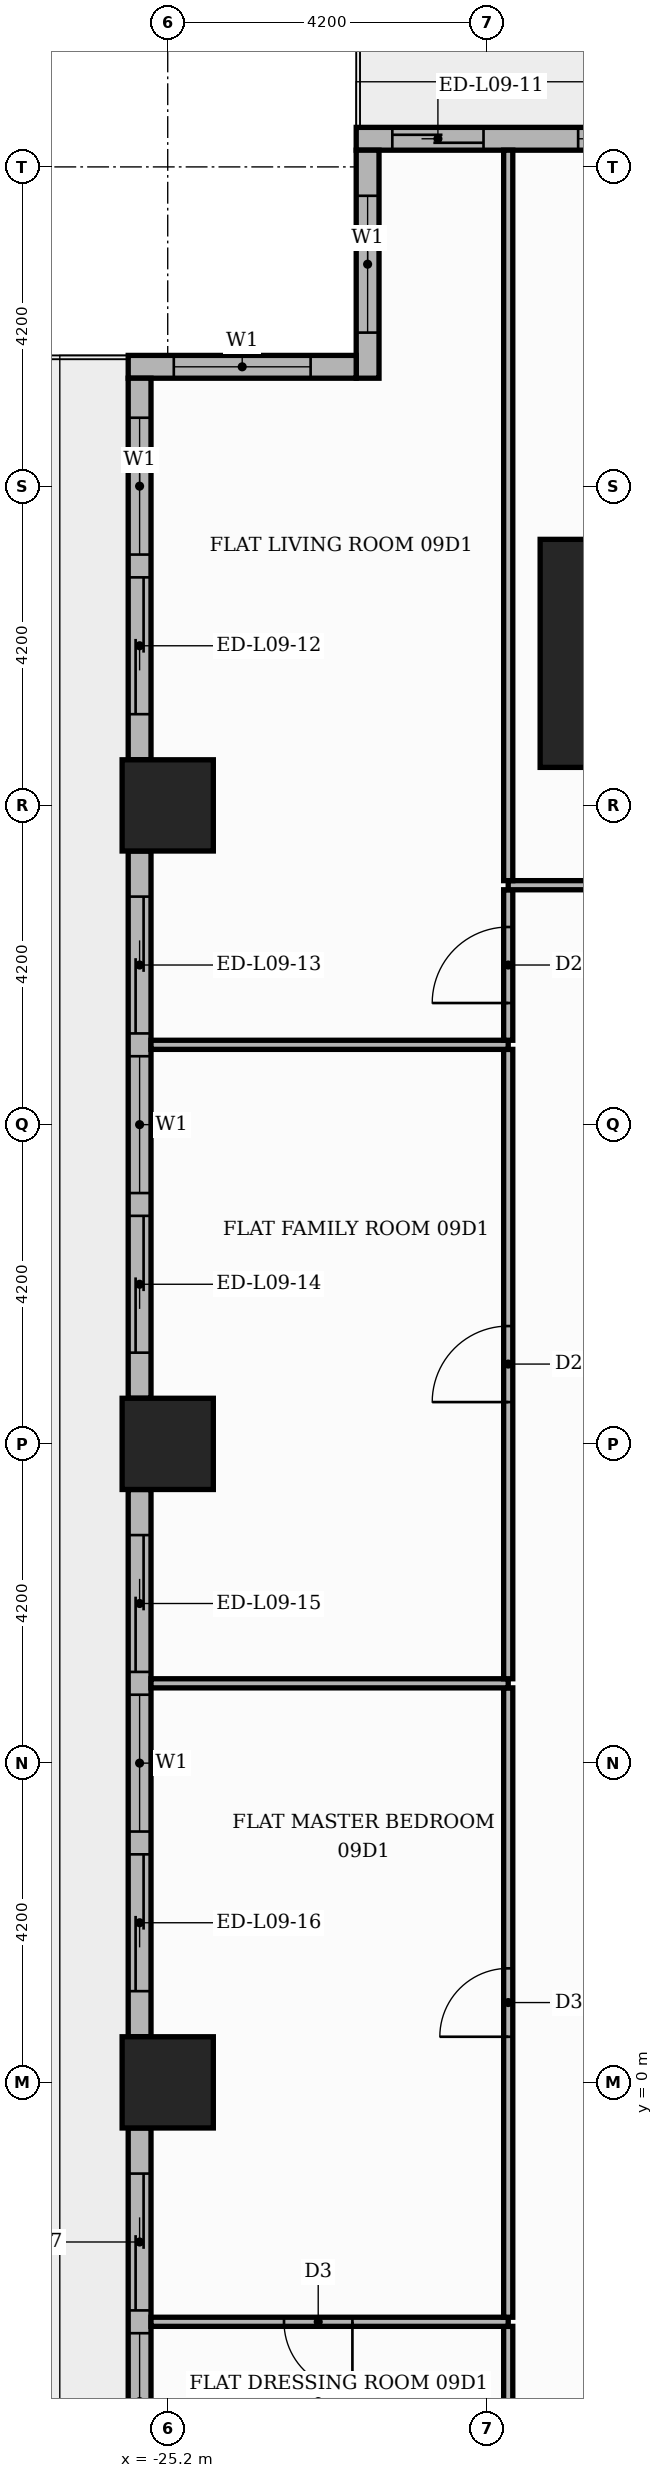
"""IFC4 building model, lengths in metres.
Left out: names, types, materials, properties, quantities, classifications, styles, units other than length and angle.
Written with IfcOpenShell. Run it as: python <this file> out.ifc"""

import sys

from ifc_helpers import new_model, si_unit, direction, frame, frame_2d, origin, origin_2d, place, context, subcontext, project, spatial, rectangle, extrude, element, fill, save


model = new_model("IFC4")
c1 = context("Model", 3, precision=1e-05, world=origin(), true_north=direction((0.0, 1.0)))
c2 = subcontext(c1, "Body", "Model", "MODEL_VIEW")
j1 = project(units=[si_unit("LENGTHUNIT", "METRE"), si_unit("PLANEANGLEUNIT", "RADIAN")], contexts=[c1])
p1 = place(None, origin())
s1 = spatial("IfcSite", under=j1, at=p1, CompositionType="ELEMENT")
p2 = place(p1, origin())
s2 = spatial("IfcBuilding", under=s1, at=p2, CompositionType="ELEMENT")
p3 = place(p2, frame((0.0, 0.0, 42.6)))
s3 = spatial("IfcBuildingStorey", under=s2, at=p3, CompositionType="ELEMENT", Elevation=42.6)
p4 = place(p3, frame((-18.8, 18.8, 0.0), z_axis=(0.0, 0.0, 1.0), x_axis=(1.0, 0.0, 0.0)))
e1 = element("IfcColumn", 1, at=p4, inside=s3, PredefinedType="COLUMN", context=c2, shape_type="SweptSolid", body=[
    extrude(rectangle(XDim=3.0, YDim=3.0, at=origin_2d()), origin(), (0.0, 0.0, 1.0), 3.9),
])
for number, where, z_axis, x_axis in (
    (2, (-25.2, 0.0, 0.0), (0.0, 0.0, 1.0), (1.0, 0.0, 0.0)),
    (3, (-25.2, 8.4, 0.0), (0.0, 0.0, 1.0), (1.0, 0.0, 0.0)),
    (4, (-25.2, 16.8, 0.0), (0.0, 0.0, 1.0), (1.0, 0.0, 0.0)),
):
    element("IfcColumn", number, at=place(p3, frame(where, z_axis=z_axis, x_axis=x_axis)), inside=s3, PredefinedType="COLUMN", context=c2, shape_type="SweptSolid", body=[
        extrude(rectangle(XDim=1.2, YDim=1.2, at=origin_2d()), origin(), (0.0, 0.0, 1.0), 3.9),
    ])
p5 = place(p3, frame((-17.4, 25.57, 0.0), z_axis=(0.0, 0.0, 1.0), x_axis=(-1.0, 0.0, 0.0)))
e5 = element("IfcWall", 5, at=p5, inside=s3, PredefinedType="STANDARD", context=c2, shape_type="SweptSolid", body=[
    extrude(rectangle(XDim=5.32, YDim=0.3, at=frame_2d((2.66, 0.0))), origin(), (0.0, 0.0, 1.0), 3.48),
])
p6 = place(p5, frame((0.6, 0.0, 0.9)))
e6 = element("IfcOpeningElement", 6, at=p6, cuts=e5, PredefinedType="OPENING", context=c2, shape_type="SweptSolid", body=[
    extrude(rectangle(XDim=1.8, YDim=2.1, at=frame_2d((0.9, 1.05))), frame((0.0, 0.16, 0.0), z_axis=(0.0, -1.0, 0.0), x_axis=(1.0, 0.0, 0.0)), (0.0, 0.0, 1.0), 0.32),
])
p7 = place(p5, frame((3.645, 0.0, 0.0)))
e7 = element("IfcOpeningElement", 7, at=p7, cuts=e5, PredefinedType="OPENING", context=c2, shape_type="SweptSolid", body=[
    extrude(rectangle(XDim=1.2, YDim=2.4, at=frame_2d((0.6, 1.2))), frame((0.0, 0.16, 0.0), z_axis=(0.0, -1.0, 0.0), x_axis=(1.0, 0.0, 0.0)), (0.0, 0.0, 1.0), 0.32),
])
p8 = place(p3, frame((-22.57, 25.42, 0.0), z_axis=(0.0, 0.0, 1.0), x_axis=(0.0, -1.0, 0.0)))
e8 = element("IfcWall", 8, at=p8, inside=s3, PredefinedType="STANDARD", context=c2, shape_type="SweptSolid", body=[
    extrude(rectangle(XDim=3.0, YDim=0.3, at=frame_2d((1.5, 0.0))), origin(), (0.0, 0.0, 1.0), 3.48),
])
p9 = place(p8, frame((0.6, 0.0, 0.9)))
e9 = element("IfcOpeningElement", 9, at=p9, cuts=e8, PredefinedType="OPENING", context=c2, shape_type="SweptSolid", body=[
    extrude(rectangle(XDim=1.8, YDim=2.1, at=frame_2d((0.9, 1.05))), frame((0.0, 0.16, 0.0), z_axis=(0.0, -1.0, 0.0), x_axis=(1.0, 0.0, 0.0)), (0.0, 0.0, 1.0), 0.32),
])
p10 = place(p3, frame((-22.72, 22.57, 0.0), z_axis=(0.0, 0.0, 1.0), x_axis=(-1.0, 0.0, 0.0)))
e10 = element("IfcWall", 10, at=p10, inside=s3, PredefinedType="STANDARD", context=c2, shape_type="SweptSolid", body=[
    extrude(rectangle(XDim=3.0, YDim=0.3, at=frame_2d((1.5, 0.0))), origin(), (0.0, 0.0, 1.0), 3.48),
])
p11 = place(p10, frame((0.6, 0.0, 0.9)))
e11 = element("IfcOpeningElement", 11, at=p11, cuts=e10, PredefinedType="OPENING", context=c2, shape_type="SweptSolid", body=[
    extrude(rectangle(XDim=1.8, YDim=2.1, at=frame_2d((0.9, 1.05))), frame((0.0, 0.16, 0.0), z_axis=(0.0, -1.0, 0.0), x_axis=(1.0, 0.0, 0.0)), (0.0, 0.0, 1.0), 0.32),
])
p12 = place(p3, frame((-25.57, 22.42, 0.0), z_axis=(0.0, 0.0, 1.0), x_axis=(0.0, -1.0, 0.0)))
e12 = element("IfcWall", 12, at=p12, inside=s3, PredefinedType="STANDARD", context=c2, shape_type="SweptSolid", body=[
    extrude(rectangle(XDim=5.02, YDim=0.3, at=frame_2d((2.51, 0.0))), origin(), (0.0, 0.0, 1.0), 3.48),
])
p13 = place(p12, frame((0.52, 0.0, 0.9)))
e13 = element("IfcOpeningElement", 13, at=p13, cuts=e12, PredefinedType="OPENING", context=c2, shape_type="SweptSolid", body=[
    extrude(rectangle(XDim=1.8, YDim=2.1, at=frame_2d((0.9, 1.05))), frame((0.0, 0.16, 0.0), z_axis=(0.0, -1.0, 0.0), x_axis=(1.0, 0.0, 0.0)), (0.0, 0.0, 1.0), 0.32),
])
p14 = place(p12, frame((2.62, 0.0, 0.0)))
e14 = element("IfcOpeningElement", 14, at=p14, cuts=e12, PredefinedType="OPENING", context=c2, shape_type="SweptSolid", body=[
    extrude(rectangle(XDim=1.8, YDim=2.4, at=frame_2d((0.9, 1.2))), frame((0.0, 0.16, 0.0), z_axis=(0.0, -1.0, 0.0), x_axis=(1.0, 0.0, 0.0)), (0.0, 0.0, 1.0), 0.32),
])
p15 = place(p3, frame((-25.57, 16.2, 0.0), z_axis=(0.0, 0.0, 1.0), x_axis=(0.0, -1.0, 0.0)))
e15 = element("IfcWall", 15, at=p15, inside=s3, PredefinedType="STANDARD", context=c2, shape_type="SweptSolid", body=[
    extrude(rectangle(XDim=7.2, YDim=0.3, at=frame_2d((3.6, 0.0))), origin(), (0.0, 0.0, 1.0), 3.48),
])
p16 = place(p15, frame((0.6, 0.0, 0.0)))
e16 = element("IfcOpeningElement", 16, at=p16, cuts=e15, PredefinedType="OPENING", context=c2, shape_type="SweptSolid", body=[
    extrude(rectangle(XDim=1.8, YDim=2.4, at=frame_2d((0.9, 1.2))), frame((0.0, 0.16, 0.0), z_axis=(0.0, -1.0, 0.0), x_axis=(1.0, 0.0, 0.0)), (0.0, 0.0, 1.0), 0.32),
])
p17 = place(p15, frame((2.7, 0.0, 0.9)))
e17 = element("IfcOpeningElement", 17, at=p17, cuts=e15, PredefinedType="OPENING", context=c2, shape_type="SweptSolid", body=[
    extrude(rectangle(XDim=1.8, YDim=2.1, at=frame_2d((0.9, 1.05))), frame((0.0, 0.16, 0.0), z_axis=(0.0, -1.0, 0.0), x_axis=(1.0, 0.0, 0.0)), (0.0, 0.0, 1.0), 0.32),
])
p18 = place(p15, frame((4.8, 0.0, 0.0)))
e18 = element("IfcOpeningElement", 18, at=p18, cuts=e15, PredefinedType="OPENING", context=c2, shape_type="SweptSolid", body=[
    extrude(rectangle(XDim=1.8, YDim=2.4, at=frame_2d((0.9, 1.2))), frame((0.0, 0.16, 0.0), z_axis=(0.0, -1.0, 0.0), x_axis=(1.0, 0.0, 0.0)), (0.0, 0.0, 1.0), 0.32),
])
p19 = place(p3, frame((-25.57, 7.8, 0.0), z_axis=(0.0, 0.0, 1.0), x_axis=(0.0, -1.0, 0.0)))
e19 = element("IfcWall", 19, at=p19, inside=s3, PredefinedType="STANDARD", context=c2, shape_type="SweptSolid", body=[
    extrude(rectangle(XDim=7.2, YDim=0.3, at=frame_2d((3.6, 0.0))), origin(), (0.0, 0.0, 1.0), 3.48),
])
p20 = place(p19, frame((0.6, 0.0, 0.0)))
e20 = element("IfcOpeningElement", 20, at=p20, cuts=e19, PredefinedType="OPENING", context=c2, shape_type="SweptSolid", body=[
    extrude(rectangle(XDim=1.8, YDim=2.4, at=frame_2d((0.9, 1.2))), frame((0.0, 0.16, 0.0), z_axis=(0.0, -1.0, 0.0), x_axis=(1.0, 0.0, 0.0)), (0.0, 0.0, 1.0), 0.32),
])
p21 = place(p19, frame((2.7, 0.0, 0.9)))
e21 = element("IfcOpeningElement", 21, at=p21, cuts=e19, PredefinedType="OPENING", context=c2, shape_type="SweptSolid", body=[
    extrude(rectangle(XDim=1.8, YDim=2.1, at=frame_2d((0.9, 1.05))), frame((0.0, 0.16, 0.0), z_axis=(0.0, -1.0, 0.0), x_axis=(1.0, 0.0, 0.0)), (0.0, 0.0, 1.0), 0.32),
])
p22 = place(p19, frame((4.8, 0.0, 0.0)))
e22 = element("IfcOpeningElement", 22, at=p22, cuts=e19, PredefinedType="OPENING", context=c2, shape_type="SweptSolid", body=[
    extrude(rectangle(XDim=1.8, YDim=2.4, at=frame_2d((0.9, 1.2))), frame((0.0, 0.16, 0.0), z_axis=(0.0, -1.0, 0.0), x_axis=(1.0, 0.0, 0.0)), (0.0, 0.0, 1.0), 0.32),
])
p23 = place(p3, frame((-25.57, -0.6, 0.0), z_axis=(0.0, 0.0, 1.0), x_axis=(0.0, -1.0, 0.0)))
e23 = element("IfcWall", 23, at=p23, inside=s3, PredefinedType="STANDARD", context=c2, shape_type="SweptSolid", body=[
    extrude(rectangle(XDim=7.2, YDim=0.3, at=frame_2d((3.6, 0.0))), origin(), (0.0, 0.0, 1.0), 3.48),
])
p24 = place(p23, frame((0.6, 0.0, 0.0)))
e24 = element("IfcOpeningElement", 24, at=p24, cuts=e23, PredefinedType="OPENING", context=c2, shape_type="SweptSolid", body=[
    extrude(rectangle(XDim=1.8, YDim=2.4, at=frame_2d((0.9, 1.2))), frame((0.0, 0.16, 0.0), z_axis=(0.0, -1.0, 0.0), x_axis=(1.0, 0.0, 0.0)), (0.0, 0.0, 1.0), 0.32),
])
p25 = place(p23, frame((2.7, 0.0, 0.9)))
e25 = element("IfcOpeningElement", 25, at=p25, cuts=e23, PredefinedType="OPENING", context=c2, shape_type="SweptSolid", body=[
    extrude(rectangle(XDim=1.8, YDim=2.1, at=frame_2d((0.9, 1.05))), frame((0.0, 0.16, 0.0), z_axis=(0.0, -1.0, 0.0), x_axis=(1.0, 0.0, 0.0)), (0.0, 0.0, 1.0), 0.32),
])
p26 = place(p23, frame((4.8, 0.0, 0.9)))
e26 = element("IfcOpeningElement", 26, at=p26, cuts=e23, PredefinedType="OPENING", context=c2, shape_type="SweptSolid", body=[
    extrude(rectangle(XDim=1.8, YDim=2.1, at=frame_2d((0.9, 1.05))), frame((0.0, 0.16, 0.0), z_axis=(0.0, -1.0, 0.0), x_axis=(1.0, 0.0, 0.0)), (0.0, 0.0, 1.0), 0.32),
])
p27 = place(p3, frame((-20.72, -5.19, 0.0), z_axis=(0.0, 0.0, 1.0), x_axis=(0.0, 1.0, 0.0)))
e27 = element("IfcWall", 27, at=p27, inside=s3, PredefinedType="PARTITIONING", context=c2, shape_type="SweptSolid", body=[
    extrude(rectangle(XDim=1.98, YDim=0.12, at=frame_2d((0.99, 0.0))), origin(), (0.0, 0.0, 1.0), 3.48),
])
p28 = place(p3, frame((-25.42, -3.15, 0.0), z_axis=(0.0, 0.0, 1.0), x_axis=(1.0, 0.0, 0.0)))
e28 = element("IfcWall", 28, at=p28, inside=s3, PredefinedType="PARTITIONING", context=c2, shape_type="SweptSolid", body=[
    extrude(rectangle(XDim=4.7, YDim=0.12, at=frame_2d((2.35, 0.0))), origin(), (0.0, 0.0, 1.0), 3.48),
])
p29 = place(p28, frame((1.75, 0.0, 0.0)))
e29 = element("IfcOpeningElement", 29, at=p29, cuts=e28, PredefinedType="OPENING", context=c2, shape_type="SweptSolid", body=[
    extrude(rectangle(XDim=0.9, YDim=2.1, at=frame_2d((0.45, 1.05))), frame((0.0, 0.07, 0.0), z_axis=(0.0, -1.0, 0.0), x_axis=(1.0, 0.0, 0.0)), (0.0, 0.0, 1.0), 0.14),
])
p30 = place(p3, frame((-20.72, -3.09, 0.0), z_axis=(0.0, 0.0, 1.0), x_axis=(0.0, 1.0, 0.0)))
e30 = element("IfcWall", 30, at=p30, inside=s3, PredefinedType="PARTITIONING", context=c2, shape_type="SweptSolid", body=[
    extrude(rectangle(XDim=8.28, YDim=0.12, at=frame_2d((4.14, 0.0))), origin(), (0.0, 0.0, 1.0), 3.48),
])
p31 = place(p30, frame((3.69, 0.0, 0.0)))
e31 = element("IfcOpeningElement", 31, at=p31, cuts=e30, PredefinedType="OPENING", context=c2, shape_type="SweptSolid", body=[
    extrude(rectangle(XDim=0.9, YDim=2.1, at=frame_2d((0.45, 1.05))), frame((0.0, 0.07, 0.0), z_axis=(0.0, -1.0, 0.0), x_axis=(1.0, 0.0, 0.0)), (0.0, 0.0, 1.0), 0.14),
])
p32 = place(p3, frame((-25.42, 5.25, 0.0), z_axis=(0.0, 0.0, 1.0), x_axis=(1.0, 0.0, 0.0)))
e32 = element("IfcWall", 32, at=p32, inside=s3, PredefinedType="PARTITIONING", context=c2, shape_type="SweptSolid", body=[
    extrude(rectangle(XDim=4.7, YDim=0.12, at=frame_2d((2.35, 0.0))), origin(), (0.0, 0.0, 1.0), 3.48),
])
p33 = place(p3, frame((-20.72, 5.31, 0.0), z_axis=(0.0, 0.0, 1.0), x_axis=(0.0, 1.0, 0.0)))
e33 = element("IfcWall", 33, at=p33, inside=s3, PredefinedType="PARTITIONING", context=c2, shape_type="SweptSolid", body=[
    extrude(rectangle(XDim=8.28, YDim=0.12, at=frame_2d((4.14, 0.0))), origin(), (0.0, 0.0, 1.0), 3.48),
])
p34 = place(p33, frame((3.64, 0.0, 0.0)))
e34 = element("IfcOpeningElement", 34, at=p34, cuts=e33, PredefinedType="OPENING", context=c2, shape_type="SweptSolid", body=[
    extrude(rectangle(XDim=1.0, YDim=2.1, at=frame_2d((0.5, 1.05))), frame((0.0, 0.07, 0.0), z_axis=(0.0, -1.0, 0.0), x_axis=(1.0, 0.0, 0.0)), (0.0, 0.0, 1.0), 0.14),
])
p35 = place(p3, frame((-25.42, 13.65, 0.0), z_axis=(0.0, 0.0, 1.0), x_axis=(1.0, 0.0, 0.0)))
e35 = element("IfcWall", 35, at=p35, inside=s3, PredefinedType="PARTITIONING", context=c2, shape_type="SweptSolid", body=[
    extrude(rectangle(XDim=4.7, YDim=0.12, at=frame_2d((2.35, 0.0))), origin(), (0.0, 0.0, 1.0), 3.48),
])
p36 = place(p3, frame((-20.72, 13.71, 0.0), z_axis=(0.0, 0.0, 1.0), x_axis=(0.0, 1.0, 0.0)))
e36 = element("IfcWall", 36, at=p36, inside=s3, PredefinedType="PARTITIONING", context=c2, shape_type="SweptSolid", body=[
    extrude(rectangle(XDim=1.98, YDim=0.12, at=frame_2d((0.99, 0.0))), origin(), (0.0, 0.0, 1.0), 3.48),
])
p37 = place(p36, frame((0.49, 0.0, 0.0)))
e37 = element("IfcOpeningElement", 37, at=p37, cuts=e36, PredefinedType="OPENING", context=c2, shape_type="SweptSolid", body=[
    extrude(rectangle(XDim=1.0, YDim=2.1, at=frame_2d((0.5, 1.05))), frame((0.0, 0.07, 0.0), z_axis=(0.0, -1.0, 0.0), x_axis=(1.0, 0.0, 0.0)), (0.0, 0.0, 1.0), 0.14),
])
p38 = place(p3, frame((-20.72, 15.75, 0.0), z_axis=(0.0, 0.0, 1.0), x_axis=(1.0, 0.0, 0.0)))
e38 = element("IfcWall", 38, at=p38, inside=s3, PredefinedType="PARTITIONING", context=c2, shape_type="SweptSolid", body=[
    extrude(rectangle(XDim=6.97, YDim=0.12, at=frame_2d((3.485, 0.0))), origin(), (0.0, 0.0, 1.0), 3.48),
])
p39 = place(p38, frame((3.085, 0.0, 0.0)))
e39 = element("IfcOpeningElement", 39, at=p39, cuts=e38, PredefinedType="OPENING", context=c2, shape_type="SweptSolid", body=[
    extrude(rectangle(XDim=0.9, YDim=2.1, at=frame_2d((0.45, 1.05))), frame((0.0, 0.07, 0.0), z_axis=(0.0, -1.0, 0.0), x_axis=(1.0, 0.0, 0.0)), (0.0, 0.0, 1.0), 0.14),
])
p40 = place(p3, frame((-20.72, 15.81, 0.0), z_axis=(0.0, 0.0, 1.0), x_axis=(0.0, 1.0, 0.0)))
e40 = element("IfcWall", 40, at=p40, inside=s3, PredefinedType="PARTITIONING", context=c2, shape_type="SweptSolid", body=[
    extrude(rectangle(XDim=9.61, YDim=0.12, at=frame_2d((4.805, 0.0))), origin(), (0.0, 0.0, 1.0), 3.48),
])
p41 = place(p6, origin())
e41 = element("IfcWindow", 41, at=p41, inside=s3, PartitioningType="SINGLE_PANEL", PredefinedType="WINDOW", context=c2, shape_type="SweptSolid", body=[
    extrude(rectangle(XDim=1.8, YDim=2.1, at=frame_2d((0.9, 1.05))), frame((0.0, 0.03, 0.0), z_axis=(0.0, -1.0, 0.0), x_axis=(1.0, 0.0, 0.0)), (0.0, 0.0, 1.0), 0.06),
])
fill(e6, e41)
p42 = place(p7, origin())
e42 = element("IfcDoor", 42, at=p42, inside=s3, OperationType="SLIDING_TO_RIGHT", PredefinedType="DOOR", context=c2, shape_type="SweptSolid", body=[
    extrude(rectangle(XDim=1.2, YDim=2.4, at=frame_2d((0.6, 1.2))), frame((0.0, 0.025, 0.0), z_axis=(0.0, -1.0, 0.0), x_axis=(1.0, 0.0, 0.0)), (0.0, 0.0, 1.0), 0.05),
])
fill(e7, e42)
p43 = place(p9, origin())
e43 = element("IfcWindow", 43, at=p43, inside=s3, PartitioningType="SINGLE_PANEL", PredefinedType="WINDOW", context=c2, shape_type="SweptSolid", body=[
    extrude(rectangle(XDim=1.8, YDim=2.1, at=frame_2d((0.9, 1.05))), frame((0.0, 0.03, 0.0), z_axis=(0.0, -1.0, 0.0), x_axis=(1.0, 0.0, 0.0)), (0.0, 0.0, 1.0), 0.06),
])
fill(e9, e43)
p44 = place(p11, origin())
e44 = element("IfcWindow", 44, at=p44, inside=s3, PartitioningType="SINGLE_PANEL", PredefinedType="WINDOW", context=c2, shape_type="SweptSolid", body=[
    extrude(rectangle(XDim=1.8, YDim=2.1, at=frame_2d((0.9, 1.05))), frame((0.0, 0.03, 0.0), z_axis=(0.0, -1.0, 0.0), x_axis=(1.0, 0.0, 0.0)), (0.0, 0.0, 1.0), 0.06),
])
fill(e11, e44)
p45 = place(p13, origin())
e45 = element("IfcWindow", 45, at=p45, inside=s3, PartitioningType="SINGLE_PANEL", PredefinedType="WINDOW", context=c2, shape_type="SweptSolid", body=[
    extrude(rectangle(XDim=1.8, YDim=2.1, at=frame_2d((0.9, 1.05))), frame((0.0, 0.03, 0.0), z_axis=(0.0, -1.0, 0.0), x_axis=(1.0, 0.0, 0.0)), (0.0, 0.0, 1.0), 0.06),
])
fill(e13, e45)
p46 = place(p14, origin())
e46 = element("IfcDoor", 46, at=p46, inside=s3, OperationType="SLIDING_TO_RIGHT", PredefinedType="DOOR", context=c2, shape_type="SweptSolid", body=[
    extrude(rectangle(XDim=1.8, YDim=2.4, at=frame_2d((0.9, 1.2))), frame((0.0, 0.025, 0.0), z_axis=(0.0, -1.0, 0.0), x_axis=(1.0, 0.0, 0.0)), (0.0, 0.0, 1.0), 0.05),
])
fill(e14, e46)
p47 = place(p16, origin())
e47 = element("IfcDoor", 47, at=p47, inside=s3, OperationType="SLIDING_TO_LEFT", PredefinedType="DOOR", context=c2, shape_type="SweptSolid", body=[
    extrude(rectangle(XDim=1.8, YDim=2.4, at=frame_2d((0.9, 1.2))), frame((0.0, 0.025, 0.0), z_axis=(0.0, -1.0, 0.0), x_axis=(1.0, 0.0, 0.0)), (0.0, 0.0, 1.0), 0.05),
])
fill(e16, e47)
p48 = place(p17, origin())
e48 = element("IfcWindow", 48, at=p48, inside=s3, PartitioningType="SINGLE_PANEL", PredefinedType="WINDOW", context=c2, shape_type="SweptSolid", body=[
    extrude(rectangle(XDim=1.8, YDim=2.1, at=frame_2d((0.9, 1.05))), frame((0.0, 0.03, 0.0), z_axis=(0.0, -1.0, 0.0), x_axis=(1.0, 0.0, 0.0)), (0.0, 0.0, 1.0), 0.06),
])
fill(e17, e48)
p49 = place(p18, origin())
e49 = element("IfcDoor", 49, at=p49, inside=s3, OperationType="SLIDING_TO_RIGHT", PredefinedType="DOOR", context=c2, shape_type="SweptSolid", body=[
    extrude(rectangle(XDim=1.8, YDim=2.4, at=frame_2d((0.9, 1.2))), frame((0.0, 0.025, 0.0), z_axis=(0.0, -1.0, 0.0), x_axis=(1.0, 0.0, 0.0)), (0.0, 0.0, 1.0), 0.05),
])
fill(e18, e49)
p50 = place(p20, origin())
e50 = element("IfcDoor", 50, at=p50, inside=s3, OperationType="SLIDING_TO_LEFT", PredefinedType="DOOR", context=c2, shape_type="SweptSolid", body=[
    extrude(rectangle(XDim=1.8, YDim=2.4, at=frame_2d((0.9, 1.2))), frame((0.0, 0.025, 0.0), z_axis=(0.0, -1.0, 0.0), x_axis=(1.0, 0.0, 0.0)), (0.0, 0.0, 1.0), 0.05),
])
fill(e20, e50)
p51 = place(p21, origin())
e51 = element("IfcWindow", 51, at=p51, inside=s3, PartitioningType="SINGLE_PANEL", PredefinedType="WINDOW", context=c2, shape_type="SweptSolid", body=[
    extrude(rectangle(XDim=1.8, YDim=2.1, at=frame_2d((0.9, 1.05))), frame((0.0, 0.03, 0.0), z_axis=(0.0, -1.0, 0.0), x_axis=(1.0, 0.0, 0.0)), (0.0, 0.0, 1.0), 0.06),
])
fill(e21, e51)
p52 = place(p22, origin())
e52 = element("IfcDoor", 52, at=p52, inside=s3, OperationType="SLIDING_TO_RIGHT", PredefinedType="DOOR", context=c2, shape_type="SweptSolid", body=[
    extrude(rectangle(XDim=1.8, YDim=2.4, at=frame_2d((0.9, 1.2))), frame((0.0, 0.025, 0.0), z_axis=(0.0, -1.0, 0.0), x_axis=(1.0, 0.0, 0.0)), (0.0, 0.0, 1.0), 0.05),
])
fill(e22, e52)
p53 = place(p24, origin())
e53 = element("IfcDoor", 53, at=p53, inside=s3, OperationType="SLIDING_TO_LEFT", PredefinedType="DOOR", context=c2, shape_type="SweptSolid", body=[
    extrude(rectangle(XDim=1.8, YDim=2.4, at=frame_2d((0.9, 1.2))), frame((0.0, 0.025, 0.0), z_axis=(0.0, -1.0, 0.0), x_axis=(1.0, 0.0, 0.0)), (0.0, 0.0, 1.0), 0.05),
])
fill(e24, e53)
p54 = place(p25, origin())
e54 = element("IfcWindow", 54, at=p54, inside=s3, PartitioningType="SINGLE_PANEL", PredefinedType="WINDOW", context=c2, shape_type="SweptSolid", body=[
    extrude(rectangle(XDim=1.8, YDim=2.1, at=frame_2d((0.9, 1.05))), frame((0.0, 0.03, 0.0), z_axis=(0.0, -1.0, 0.0), x_axis=(1.0, 0.0, 0.0)), (0.0, 0.0, 1.0), 0.06),
])
fill(e25, e54)
p55 = place(p37, origin())
e55 = element("IfcDoor", 55, at=p55, inside=s3, OperationType="SINGLE_SWING_LEFT", PredefinedType="DOOR", context=c2, shape_type="SweptSolid", body=[
    extrude(rectangle(XDim=1.0, YDim=2.1, at=frame_2d((0.5, 1.05))), frame((0.0, 0.025, 0.0), z_axis=(0.0, -1.0, 0.0), x_axis=(1.0, 0.0, 0.0)), (0.0, 0.0, 1.0), 0.05),
])
fill(e37, e55)
p56 = place(p34, origin())
e56 = element("IfcDoor", 56, at=p56, inside=s3, OperationType="SINGLE_SWING_LEFT", PredefinedType="DOOR", context=c2, shape_type="SweptSolid", body=[
    extrude(rectangle(XDim=1.0, YDim=2.1, at=frame_2d((0.5, 1.05))), frame((0.0, 0.025, 0.0), z_axis=(0.0, -1.0, 0.0), x_axis=(1.0, 0.0, 0.0)), (0.0, 0.0, 1.0), 0.05),
])
fill(e34, e56)
p57 = place(p31, origin())
e57 = element("IfcDoor", 57, at=p57, inside=s3, OperationType="SINGLE_SWING_LEFT", PredefinedType="DOOR", context=c2, shape_type="SweptSolid", body=[
    extrude(rectangle(XDim=0.9, YDim=2.1, at=frame_2d((0.45, 1.05))), frame((0.0, 0.025, 0.0), z_axis=(0.0, -1.0, 0.0), x_axis=(1.0, 0.0, 0.0)), (0.0, 0.0, 1.0), 0.05),
])
fill(e31, e57)
p58 = place(p29, frame((0.9, 0.0, 0.0), z_axis=(0.0, 0.0, 1.0), x_axis=(-1.0, 0.0, 0.0)))
e58 = element("IfcDoor", 58, at=p58, inside=s3, OperationType="SINGLE_SWING_RIGHT", PredefinedType="DOOR", context=c2, shape_type="SweptSolid", body=[
    extrude(rectangle(XDim=0.9, YDim=2.1, at=frame_2d((0.45, 1.05))), frame((0.0, 0.025, 0.0), z_axis=(0.0, -1.0, 0.0), x_axis=(1.0, 0.0, 0.0)), (0.0, 0.0, 1.0), 0.05),
])
fill(e29, e58)
save(model, sys.argv[1])
